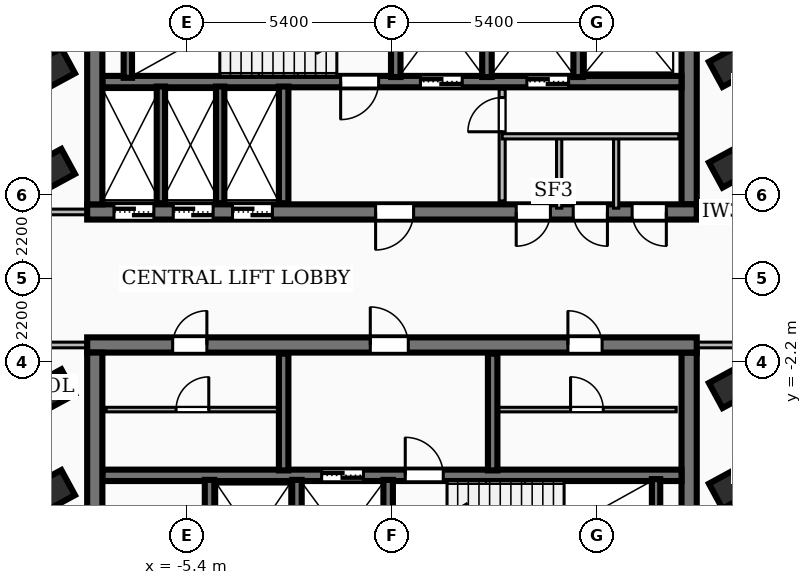
"""IFC4 building model, lengths in metres.
Left out: names, types, materials, properties, quantities, classifications, styles, units other than length and angle.
Written with IfcOpenShell. Run it as: python <this file> out.ifc"""

import sys

from ifc_helpers import new_model, si_unit, direction, frame, frame_2d, origin, origin_2d, place, context, subcontext, project, spatial, rectangle, extrude, element, fill, save


model = new_model("IFC4")
c1 = context("Model", 3, precision=1e-05, world=origin(), true_north=direction((0.0, 1.0)))
c2 = subcontext(c1, "Body", "Model", "MODEL_VIEW")
j1 = project(units=[si_unit("LENGTHUNIT", "METRE"), si_unit("PLANEANGLEUNIT", "RADIAN")], contexts=[c1])
p1 = place(None, origin())
s1 = spatial("IfcSite", under=j1, at=p1, CompositionType="ELEMENT")
p2 = place(p1, origin())
s2 = spatial("IfcBuilding", under=s1, at=p2, CompositionType="ELEMENT")
p3 = place(p2, frame((0.0, 0.0, 200.88)))
s3 = spatial("IfcBuildingStorey", under=s2, at=p3, CompositionType="ELEMENT", Elevation=200.88)
p4 = place(p3, frame((8.02, 1.75, 0.0), z_axis=(0.0, 0.0, 1.0), x_axis=(-1.0, 0.0, 0.0)))
e1 = element("IfcWall", 1, at=p4, inside=s3, PredefinedType="SHEAR", context=c2, shape_type="SweptSolid", body=[
    extrude(rectangle(XDim=16.04, YDim=0.4, at=frame_2d((8.02, 0.0))), origin(), (0.0, 0.0, 1.0), 4.06),
])
p5 = place(p4, frame((7.45, 0.0, 0.0)))
e2 = element("IfcOpeningElement", 2, at=p5, cuts=e1, PredefinedType="OPENING", context=c2, shape_type="SweptSolid", body=[
    extrude(rectangle(XDim=1.0, YDim=2.1, at=frame_2d((0.5, 1.05))), frame((0.0, 0.21, 0.0), z_axis=(0.0, -1.0, 0.0), x_axis=(1.0, 0.0, 0.0)), (0.0, 0.0, 1.0), 0.42),
])
p6 = place(p4, frame((14.285, 0.0, 0.0)))
e3 = element("IfcOpeningElement", 3, at=p6, cuts=e1, PredefinedType="OPENING", context=c2, shape_type="SweptSolid", body=[
    extrude(rectangle(XDim=1.05, YDim=2.15, at=frame_2d((0.525, 1.075))), frame((0.0, 0.21, 0.0), z_axis=(0.0, -1.0, 0.0), x_axis=(1.0, 0.0, 0.0)), (0.0, 0.0, 1.0), 0.42),
])
p7 = place(p4, frame((12.725, 0.0, 0.0)))
e4 = element("IfcOpeningElement", 4, at=p7, cuts=e1, PredefinedType="OPENING", context=c2, shape_type="SweptSolid", body=[
    extrude(rectangle(XDim=1.05, YDim=2.15, at=frame_2d((0.525, 1.075))), frame((0.0, 0.21, 0.0), z_axis=(0.0, -1.0, 0.0), x_axis=(1.0, 0.0, 0.0)), (0.0, 0.0, 1.0), 0.42),
])
p8 = place(p4, frame((11.165, 0.0, 0.0)))
e5 = element("IfcOpeningElement", 5, at=p8, cuts=e1, PredefinedType="OPENING", context=c2, shape_type="SweptSolid", body=[
    extrude(rectangle(XDim=1.05, YDim=2.15, at=frame_2d((0.525, 1.075))), frame((0.0, 0.21, 0.0), z_axis=(0.0, -1.0, 0.0), x_axis=(1.0, 0.0, 0.0)), (0.0, 0.0, 1.0), 0.42),
])
p9 = place(p4, frame((3.85, 0.0, 0.0)))
e6 = element("IfcOpeningElement", 6, at=p9, cuts=e1, PredefinedType="OPENING", context=c2, shape_type="SweptSolid", body=[
    extrude(rectangle(XDim=0.9, YDim=2.06, at=frame_2d((0.45, 1.03))), frame((0.0, 0.21, 0.0), z_axis=(0.0, -1.0, 0.0), x_axis=(1.0, 0.0, 0.0)), (0.0, 0.0, 1.0), 0.42),
])
p10 = place(p4, frame((2.35, 0.0, 0.0)))
e7 = element("IfcOpeningElement", 7, at=p10, cuts=e1, PredefinedType="OPENING", context=c2, shape_type="SweptSolid", body=[
    extrude(rectangle(XDim=0.9, YDim=2.06, at=frame_2d((0.45, 1.03))), frame((0.0, 0.21, 0.0), z_axis=(0.0, -1.0, 0.0), x_axis=(1.0, 0.0, 0.0)), (0.0, 0.0, 1.0), 0.42),
])
p11 = place(p4, frame((0.8, 0.0, 0.0)))
e8 = element("IfcOpeningElement", 8, at=p11, cuts=e1, PredefinedType="OPENING", context=c2, shape_type="SweptSolid", body=[
    extrude(rectangle(XDim=0.9, YDim=2.06, at=frame_2d((0.45, 1.03))), frame((0.0, 0.21, 0.0), z_axis=(0.0, -1.0, 0.0), x_axis=(1.0, 0.0, 0.0)), (0.0, 0.0, 1.0), 0.42),
])
for number, where, z_axis, x_axis in (
    (9, (-7.82, 1.95, 0.0), (0.0, 0.0, 1.0), (0.0, 1.0, 0.0)),
    (10, (7.82, 8.31, 0.0), (0.0, 0.0, 1.0), (0.0, -1.0, 0.0)),
):
    element("IfcWall", number, at=place(p3, frame(where, z_axis=z_axis, x_axis=x_axis)), inside=s3, PredefinedType="SHEAR", context=c2, shape_type="SweptSolid", body=[
        extrude(rectangle(XDim=6.36, YDim=0.4, at=frame_2d((3.18, 0.0))), origin(), (0.0, 0.0, 1.0), 4.06),
    ])
p12 = place(p3, frame((7.62, 5.18, 0.0), z_axis=(0.0, 0.0, 1.0), x_axis=(-1.0, 0.0, 0.0)))
e11 = element("IfcWall", 11, at=p12, inside=s3, PredefinedType="SOLIDWALL", context=c2, shape_type="SweptSolid", body=[
    extrude(rectangle(XDim=15.24, YDim=0.3, at=frame_2d((7.62, 0.0))), origin(), (0.0, 0.0, 1.0), 4.06),
])
p13 = place(p12, frame((5.77, 0.0, 0.0)))
e12 = element("IfcOpeningElement", 12, at=p13, cuts=e11, PredefinedType="OPENING", context=c2, shape_type="SweptSolid", body=[
    extrude(rectangle(XDim=1.1, YDim=2.15, at=frame_2d((0.55, 1.075))), frame((0.0, 0.16, 0.0), z_axis=(0.0, -1.0, 0.0), x_axis=(1.0, 0.0, 0.0)), (0.0, 0.0, 1.0), 0.32),
])
p14 = place(p12, frame((2.97, 0.0, 0.0)))
e13 = element("IfcOpeningElement", 13, at=p14, cuts=e11, PredefinedType="OPENING", context=c2, shape_type="SweptSolid", body=[
    extrude(rectangle(XDim=1.1, YDim=2.15, at=frame_2d((0.55, 1.075))), frame((0.0, 0.16, 0.0), z_axis=(0.0, -1.0, 0.0), x_axis=(1.0, 0.0, 0.0)), (0.0, 0.0, 1.0), 0.32),
])
p15 = place(p12, frame((7.97, 0.0, 0.0)))
e14 = element("IfcOpeningElement", 14, at=p15, cuts=e11, PredefinedType="OPENING", context=c2, shape_type="SweptSolid", body=[
    extrude(rectangle(XDim=1.0, YDim=2.1, at=frame_2d((0.5, 1.05))), frame((0.0, 0.16, 0.0), z_axis=(0.0, -1.0, 0.0), x_axis=(1.0, 0.0, 0.0)), (0.0, 0.0, 1.0), 0.32),
])
p16 = place(p3, frame((-8.02, -1.75, 0.0), z_axis=(0.0, 0.0, 1.0), x_axis=(1.0, 0.0, 0.0)))
e15 = element("IfcWall", 15, at=p16, inside=s3, PredefinedType="SHEAR", context=c2, shape_type="SweptSolid", body=[
    extrude(rectangle(XDim=16.04, YDim=0.4, at=frame_2d((8.02, 0.0))), origin(), (0.0, 0.0, 1.0), 4.06),
])
p17 = place(p16, frame((7.45, 0.0, 0.0)))
e16 = element("IfcOpeningElement", 16, at=p17, cuts=e15, PredefinedType="OPENING", context=c2, shape_type="SweptSolid", body=[
    extrude(rectangle(XDim=1.0, YDim=2.1, at=frame_2d((0.5, 1.05))), frame((0.0, 0.21, 0.0), z_axis=(0.0, -1.0, 0.0), x_axis=(1.0, 0.0, 0.0)), (0.0, 0.0, 1.0), 0.42),
])
p18 = place(p16, frame((12.65, 0.0, 0.0)))
e17 = element("IfcOpeningElement", 17, at=p18, cuts=e15, PredefinedType="OPENING", context=c2, shape_type="SweptSolid", body=[
    extrude(rectangle(XDim=0.9, YDim=2.06, at=frame_2d((0.45, 1.03))), frame((0.0, 0.21, 0.0), z_axis=(0.0, -1.0, 0.0), x_axis=(1.0, 0.0, 0.0)), (0.0, 0.0, 1.0), 0.42),
])
p19 = place(p16, frame((2.25, 0.0, 0.0)))
e18 = element("IfcOpeningElement", 18, at=p19, cuts=e15, PredefinedType="OPENING", context=c2, shape_type="SweptSolid", body=[
    extrude(rectangle(XDim=0.9, YDim=2.06, at=frame_2d((0.45, 1.03))), frame((0.0, 0.21, 0.0), z_axis=(0.0, -1.0, 0.0), x_axis=(1.0, 0.0, 0.0)), (0.0, 0.0, 1.0), 0.42),
])
for number, where, z_axis, x_axis in (
    (19, (-7.82, -8.31, 0.0), (0.0, 0.0, 1.0), (0.0, 1.0, 0.0)),
    (20, (7.82, -1.95, 0.0), (0.0, 0.0, 1.0), (0.0, -1.0, 0.0)),
):
    element("IfcWall", number, at=place(p3, frame(where, z_axis=z_axis, x_axis=x_axis)), inside=s3, PredefinedType="SHEAR", context=c2, shape_type="SweptSolid", body=[
        extrude(rectangle(XDim=6.36, YDim=0.4, at=frame_2d((3.18, 0.0))), origin(), (0.0, 0.0, 1.0), 4.06),
    ])
p20 = place(p3, frame((-7.62, -5.18, 0.0), z_axis=(0.0, 0.0, 1.0), x_axis=(1.0, 0.0, 0.0)))
e21 = element("IfcWall", 21, at=p20, inside=s3, PredefinedType="SOLIDWALL", context=c2, shape_type="SweptSolid", body=[
    extrude(rectangle(XDim=15.24, YDim=0.3, at=frame_2d((7.62, 0.0))), origin(), (0.0, 0.0, 1.0), 4.06),
])
p21 = place(p20, frame((5.77, 0.0, 0.0)))
e22 = element("IfcOpeningElement", 22, at=p21, cuts=e21, PredefinedType="OPENING", context=c2, shape_type="SweptSolid", body=[
    extrude(rectangle(XDim=1.1, YDim=2.15, at=frame_2d((0.55, 1.075))), frame((0.0, 0.16, 0.0), z_axis=(0.0, -1.0, 0.0), x_axis=(1.0, 0.0, 0.0)), (0.0, 0.0, 1.0), 0.32),
])
p22 = place(p20, frame((7.97, 0.0, 0.0)))
e23 = element("IfcOpeningElement", 23, at=p22, cuts=e21, PredefinedType="OPENING", context=c2, shape_type="SweptSolid", body=[
    extrude(rectangle(XDim=1.0, YDim=2.1, at=frame_2d((0.5, 1.05))), frame((0.0, 0.16, 0.0), z_axis=(0.0, -1.0, 0.0), x_axis=(1.0, 0.0, 0.0)), (0.0, 0.0, 1.0), 0.32),
])
for number, where, z_axis, x_axis in (
    (24, (-6.95, 5.28, 0.0), (0.0, 0.0, 1.0), (0.0, 1.0, 0.0)),
    (25, (6.95, -8.34, 0.0), (0.0, 0.0, 1.0), (0.0, 1.0, 0.0)),
):
    element("IfcWall", number, at=place(p3, frame(where, z_axis=z_axis, x_axis=x_axis)), inside=s3, PredefinedType="SOLIDWALL", context=c2, shape_type="SweptSolid", body=[
        extrude(rectangle(XDim=3.06, YDim=0.22, at=frame_2d((1.53, 0.0))), origin(), (0.0, 0.0, 1.0), 4.06),
    ])
for number, where, z_axis, x_axis in (
    (26, (0.1, 5.3, 0.0), (0.0, 0.0, 1.0), (0.0, 1.0, 0.0)),
    (27, (2.5, 5.3, 0.0), (0.0, 0.0, 1.0), (0.0, 1.0, 0.0)),
    (28, (4.9, 5.3, 0.0), (0.0, 0.0, 1.0), (0.0, 1.0, 0.0)),
):
    element("IfcWall", number, at=place(p3, frame(where, z_axis=z_axis, x_axis=x_axis)), inside=s3, PredefinedType="SOLIDWALL", context=c2, shape_type="SweptSolid", body=[
        extrude(rectangle(XDim=3.04, YDim=0.25, at=frame_2d((1.52, 0.0))), origin(), (0.0, 0.0, 1.0), 4.06),
    ])
p23 = place(p3, frame((-2.85, 1.98, 0.0), z_axis=(0.0, 0.0, 1.0), x_axis=(0.0, 1.0, 0.0)))
e29 = element("IfcWall", 29, at=p23, inside=s3, PredefinedType="SOLIDWALL", context=c2, shape_type="SweptSolid", body=[
    extrude(rectangle(XDim=3.07, YDim=0.25, at=frame_2d((1.535, 0.0))), origin(), (0.0, 0.0, 1.0), 4.06),
])
for number, where, z_axis, x_axis in (
    (30, (-0.1, -8.34, 0.0), (0.0, 0.0, 1.0), (0.0, 1.0, 0.0)),
    (31, (-2.5, -8.34, 0.0), (0.0, 0.0, 1.0), (0.0, 1.0, 0.0)),
    (32, (-4.8, -8.34, 0.0), (0.0, 0.0, 1.0), (0.0, 1.0, 0.0)),
):
    element("IfcWall", number, at=place(p3, frame(where, z_axis=z_axis, x_axis=x_axis)), inside=s3, PredefinedType="SOLIDWALL", context=c2, shape_type="SweptSolid", body=[
        extrude(rectangle(XDim=3.04, YDim=0.25, at=frame_2d((1.52, 0.0))), origin(), (0.0, 0.0, 1.0), 4.06),
    ])
for number, where, z_axis, x_axis in (
    (33, (-2.85, -5.05, 0.0), (0.0, 0.0, 1.0), (0.0, 1.0, 0.0)),
    (34, (2.65, -5.05, 0.0), (0.0, 0.0, 1.0), (0.0, 1.0, 0.0)),
):
    element("IfcWall", number, at=place(p3, frame(where, z_axis=z_axis, x_axis=x_axis)), inside=s3, PredefinedType="SOLIDWALL", context=c2, shape_type="SweptSolid", body=[
        extrude(rectangle(XDim=3.07, YDim=0.25, at=frame_2d((1.535, 0.0))), origin(), (0.0, 0.0, 1.0), 4.06),
    ])
for number, where, z_axis, x_axis in (
    (35, (-6.08, 1.98, 0.0), (0.0, 0.0, 1.0), (0.0, 1.0, 0.0)),
    (36, (-4.52, 1.98, 0.0), (0.0, 0.0, 1.0), (0.0, 1.0, 0.0)),
):
    element("IfcWall", number, at=place(p3, frame(where, z_axis=z_axis, x_axis=x_axis)), inside=s3, PredefinedType="SOLIDWALL", context=c2, shape_type="SweptSolid", body=[
        extrude(rectangle(XDim=3.07, YDim=0.22, at=frame_2d((1.535, 0.0))), origin(), (0.0, 0.0, 1.0), 4.06),
    ])
for number, where, z_axis, x_axis in (
    (37, (-8.85, -5.55, 0.0), (0.0, 0.0, 1.0), (0.879, 0.477, 0.0)),
    (38, (-8.85, -2.9, 0.0), (0.0, 0.0, 1.0), (0.879, 0.477, 0.0)),
    (39, (-8.85, 2.9, 0.0), (0.0, 0.0, 1.0), (0.879, 0.477, 0.0)),
    (40, (-8.85, 5.55, 0.0), (0.0, 0.0, 1.0), (0.879, 0.477, 0.0)),
    (41, (8.85, -5.55, 0.0), (0.0, 0.0, 1.0), (0.879, 0.477, 0.0)),
    (42, (8.85, -2.9, 0.0), (0.0, 0.0, 1.0), (0.879, 0.477, 0.0)),
    (43, (8.85, 2.9, 0.0), (0.0, 0.0, 1.0), (0.879, 0.477, 0.0)),
    (44, (8.85, 5.55, 0.0), (0.0, 0.0, 1.0), (0.879, 0.477, 0.0)),
):
    element("IfcColumn", number, at=place(p3, frame(where, z_axis=z_axis, x_axis=x_axis)), inside=s3, PredefinedType="COLUMN", context=c2, shape_type="SweptSolid", body=[
        extrude(rectangle(XDim=0.75, YDim=0.75, at=origin_2d()), origin(), (0.0, 0.0, 1.0), 4.32),
    ])
p24 = place(p3, frame((-6.514, -18.286, 0.0), z_axis=(0.0, 0.0, 1.0), x_axis=(-0.477173953596, 0.878808863183, 0.0)))
e45 = element("IfcWall", 45, at=p24, inside=s3, PredefinedType="SOLIDWALL", context=c2, shape_type="SweptSolid", body=[
    extrude(rectangle(XDim=25.924, YDim=0.2, at=frame_2d((12.962, 0.0))), origin(), (0.0, 0.0, 1.0), 4.06),
])
p25 = place(p24, frame((12.412, 0.0, 0.0)))
e46 = element("IfcOpeningElement", 46, at=p25, cuts=e45, PredefinedType="OPENING", context=c2, shape_type="SweptSolid", body=[
    extrude(rectangle(XDim=1.1, YDim=2.1, at=frame_2d((0.55, 1.05))), frame((0.0, 0.11, 0.0), z_axis=(0.0, -1.0, 0.0), x_axis=(1.0, 0.0, 0.0)), (0.0, 0.0, 1.0), 0.22),
])
p26 = place(p3, frame((2.9, 2.04, 0.0), z_axis=(0.0, 0.0, 1.0), x_axis=(0.0, 1.0, 0.0)))
e47 = element("IfcWall", 47, at=p26, inside=s3, PredefinedType="PARTITIONING", context=c2, shape_type="SweptSolid", body=[
    extrude(rectangle(XDim=2.94, YDim=0.16, at=frame_2d((1.47, 0.0))), origin(), (0.0, 0.0, 1.0), 3.29),
])
p27 = place(p26, frame((1.82, 0.0, 0.0)))
e48 = element("IfcOpeningElement", 48, at=p27, cuts=e47, PredefinedType="OPENING", context=c2, shape_type="SweptSolid", body=[
    extrude(rectangle(XDim=0.9, YDim=2.06, at=frame_2d((0.45, 1.03))), frame((0.0, 0.09, 0.0), z_axis=(0.0, -1.0, 0.0), x_axis=(1.0, 0.0, 0.0)), (0.0, 0.0, 1.0), 0.18),
])
p28 = place(p3, frame((2.9, 3.74, 0.0), z_axis=(0.0, 0.0, 1.0), x_axis=(1.0, 0.0, 0.0)))
e49 = element("IfcWall", 49, at=p28, inside=s3, PredefinedType="PARTITIONING", context=c2, shape_type="SweptSolid", body=[
    extrude(rectangle(XDim=4.65, YDim=0.138, at=frame_2d((2.325, 0.0))), origin(), (0.0, 0.0, 1.0), 4.06),
])
p29 = place(p3, frame((2.8, -3.45, 0.0), z_axis=(0.0, 0.0, 1.0), x_axis=(1.0, 0.0, 0.0)))
e50 = element("IfcWall", 50, at=p29, inside=s3, PredefinedType="PARTITIONING", context=c2, shape_type="SweptSolid", body=[
    extrude(rectangle(XDim=4.68, YDim=0.12, at=frame_2d((2.34, 0.0))), origin(), (0.0, 0.0, 1.0), 4.06),
])
p30 = place(p29, frame((1.9, 0.0, 0.0)))
e51 = element("IfcOpeningElement", 51, at=p30, cuts=e50, PredefinedType="OPENING", context=c2, shape_type="SweptSolid", body=[
    extrude(rectangle(XDim=0.86, YDim=2.04, at=frame_2d((0.43, 1.02))), frame((0.0, 0.07, 0.0), z_axis=(0.0, -1.0, 0.0), x_axis=(1.0, 0.0, 0.0)), (0.0, 0.0, 1.0), 0.14),
])
p31 = place(p3, frame((-7.52, -3.45, 0.0), z_axis=(0.0, 0.0, 1.0), x_axis=(1.0, 0.0, 0.0)))
e52 = element("IfcWall", 52, at=p31, inside=s3, PredefinedType="PARTITIONING", context=c2, shape_type="SweptSolid", body=[
    extrude(rectangle(XDim=4.54, YDim=0.12, at=frame_2d((2.27, 0.0))), origin(), (0.0, 0.0, 1.0), 4.06),
])
p32 = place(p31, frame((1.84, 0.0, 0.0)))
e53 = element("IfcOpeningElement", 53, at=p32, cuts=e52, PredefinedType="OPENING", context=c2, shape_type="SweptSolid", body=[
    extrude(rectangle(XDim=0.86, YDim=2.04, at=frame_2d((0.43, 1.02))), frame((0.0, 0.07, 0.0), z_axis=(0.0, -1.0, 0.0), x_axis=(1.0, 0.0, 0.0)), (0.0, 0.0, 1.0), 0.14),
])
for number, where, z_axis, x_axis in (
    (54, (4.4, 1.85, 0.0), (0.0, 0.0, 1.0), (0.0, 1.0, 0.0)),
    (55, (5.9, 1.85, 0.0), (0.0, 0.0, 1.0), (0.0, 1.0, 0.0)),
):
    element("IfcWall", number, at=place(p3, frame(where, z_axis=z_axis, x_axis=x_axis)), inside=s3, PredefinedType="PARTITIONING", context=c2, shape_type="SweptSolid", body=[
        extrude(rectangle(XDim=1.89, YDim=0.138, at=frame_2d((0.945, 0.0))), origin(), (0.0, 0.0, 1.0), 3.29),
    ])
for number, where, z_axis, x_axis in (
    (56, (-7.85, 1.75, 0.0), (0.0, 0.0, 1.0), (-1.0, 0.0, 0.0)),
    (57, (-7.85, -1.75, 0.0), (0.0, 0.0, 1.0), (-1.0, 0.0, 0.0)),
    (58, (7.85, 1.75, 0.0), (0.0, 0.0, 1.0), (1.0, 0.0, 0.0)),
    (59, (7.85, -1.75, 0.0), (0.0, 0.0, 1.0), (1.0, 0.0, 0.0)),
):
    element("IfcWall", number, at=place(p3, frame(where, z_axis=z_axis, x_axis=x_axis)), inside=s3, PredefinedType="PARTITIONING", context=c2, shape_type="SweptSolid", body=[
        extrude(rectangle(XDim=1.67, YDim=0.15, at=frame_2d((0.835, 0.0))), origin(), (0.0, 0.0, 1.0), 3.29),
    ])
p33 = place(p5, origin())
e60 = element("IfcDoor", 60, at=p33, inside=s3, OperationType="SINGLE_SWING_RIGHT", PredefinedType="DOOR", context=c2, shape_type="SweptSolid", body=[
    extrude(rectangle(XDim=1.0, YDim=2.1, at=frame_2d((0.5, 1.05))), frame((0.0, 0.025, 0.0), z_axis=(0.0, -1.0, 0.0), x_axis=(1.0, 0.0, 0.0)), (0.0, 0.0, 1.0), 0.05),
])
fill(e2, e60)
p34 = place(p17, origin())
e61 = element("IfcDoor", 61, at=p34, inside=s3, OperationType="SINGLE_SWING_LEFT", PredefinedType="DOOR", context=c2, shape_type="SweptSolid", body=[
    extrude(rectangle(XDim=1.0, YDim=2.1, at=frame_2d((0.5, 1.05))), frame((0.0, 0.025, 0.0), z_axis=(0.0, -1.0, 0.0), x_axis=(1.0, 0.0, 0.0)), (0.0, 0.0, 1.0), 0.05),
])
fill(e16, e61)
p35 = place(p13, origin())
e62 = element("IfcDoor", 62, at=p35, inside=s3, OperationType="DOUBLE_DOOR_SLIDING", PredefinedType="DOOR", context=c2, shape_type="SweptSolid", body=[
    extrude(rectangle(XDim=1.1, YDim=2.15, at=frame_2d((0.55, 1.075))), frame((0.0, 0.025, 0.0), z_axis=(0.0, -1.0, 0.0), x_axis=(1.0, 0.0, 0.0)), (0.0, 0.0, 1.0), 0.05),
])
fill(e12, e62)
p36 = place(p14, origin())
e63 = element("IfcDoor", 63, at=p36, inside=s3, OperationType="DOUBLE_DOOR_SLIDING", PredefinedType="DOOR", context=c2, shape_type="SweptSolid", body=[
    extrude(rectangle(XDim=1.1, YDim=2.15, at=frame_2d((0.55, 1.075))), frame((0.0, 0.025, 0.0), z_axis=(0.0, -1.0, 0.0), x_axis=(1.0, 0.0, 0.0)), (0.0, 0.0, 1.0), 0.05),
])
fill(e13, e63)
p37 = place(p15, origin())
e64 = element("IfcDoor", 64, at=p37, inside=s3, OperationType="SINGLE_SWING_RIGHT", PredefinedType="DOOR", context=c2, shape_type="SweptSolid", body=[
    extrude(rectangle(XDim=1.0, YDim=2.1, at=frame_2d((0.5, 1.05))), frame((0.0, 0.025, 0.0), z_axis=(0.0, -1.0, 0.0), x_axis=(1.0, 0.0, 0.0)), (0.0, 0.0, 1.0), 0.05),
])
fill(e14, e64)
p38 = place(p21, origin())
e65 = element("IfcDoor", 65, at=p38, inside=s3, OperationType="DOUBLE_DOOR_SLIDING", PredefinedType="DOOR", context=c2, shape_type="SweptSolid", body=[
    extrude(rectangle(XDim=1.1, YDim=2.15, at=frame_2d((0.55, 1.075))), frame((0.0, 0.025, 0.0), z_axis=(0.0, -1.0, 0.0), x_axis=(1.0, 0.0, 0.0)), (0.0, 0.0, 1.0), 0.05),
])
fill(e22, e65)
p39 = place(p22, origin())
e66 = element("IfcDoor", 66, at=p39, inside=s3, OperationType="SINGLE_SWING_LEFT", PredefinedType="DOOR", context=c2, shape_type="SweptSolid", body=[
    extrude(rectangle(XDim=1.0, YDim=2.1, at=frame_2d((0.5, 1.05))), frame((0.0, 0.025, 0.0), z_axis=(0.0, -1.0, 0.0), x_axis=(1.0, 0.0, 0.0)), (0.0, 0.0, 1.0), 0.05),
])
fill(e23, e66)
p40 = place(p6, origin())
e67 = element("IfcDoor", 67, at=p40, inside=s3, OperationType="DOUBLE_DOOR_SLIDING", PredefinedType="DOOR", context=c2, shape_type="SweptSolid", body=[
    extrude(rectangle(XDim=1.05, YDim=2.15, at=frame_2d((0.525, 1.075))), frame((0.0, 0.025, 0.0), z_axis=(0.0, -1.0, 0.0), x_axis=(1.0, 0.0, 0.0)), (0.0, 0.0, 1.0), 0.05),
])
fill(e3, e67)
p41 = place(p7, origin())
e68 = element("IfcDoor", 68, at=p41, inside=s3, OperationType="DOUBLE_DOOR_SLIDING", PredefinedType="DOOR", context=c2, shape_type="SweptSolid", body=[
    extrude(rectangle(XDim=1.05, YDim=2.15, at=frame_2d((0.525, 1.075))), frame((0.0, 0.025, 0.0), z_axis=(0.0, -1.0, 0.0), x_axis=(1.0, 0.0, 0.0)), (0.0, 0.0, 1.0), 0.05),
])
fill(e4, e68)
p42 = place(p8, origin())
e69 = element("IfcDoor", 69, at=p42, inside=s3, OperationType="DOUBLE_DOOR_SLIDING", PredefinedType="DOOR", context=c2, shape_type="SweptSolid", body=[
    extrude(rectangle(XDim=1.05, YDim=2.15, at=frame_2d((0.525, 1.075))), frame((0.0, 0.025, 0.0), z_axis=(0.0, -1.0, 0.0), x_axis=(1.0, 0.0, 0.0)), (0.0, 0.0, 1.0), 0.05),
])
fill(e5, e69)
p43 = place(p18, origin())
e70 = element("IfcDoor", 70, at=p43, inside=s3, OperationType="SINGLE_SWING_LEFT", PredefinedType="DOOR", context=c2, shape_type="SweptSolid", body=[
    extrude(rectangle(XDim=0.9, YDim=2.06, at=frame_2d((0.45, 1.03))), frame((0.0, 0.025, 0.0), z_axis=(0.0, -1.0, 0.0), x_axis=(1.0, 0.0, 0.0)), (0.0, 0.0, 1.0), 0.05),
])
fill(e17, e70)
p44 = place(p19, origin())
e71 = element("IfcDoor", 71, at=p44, inside=s3, OperationType="SINGLE_SWING_RIGHT", PredefinedType="DOOR", context=c2, shape_type="SweptSolid", body=[
    extrude(rectangle(XDim=0.9, YDim=2.06, at=frame_2d((0.45, 1.03))), frame((0.0, 0.025, 0.0), z_axis=(0.0, -1.0, 0.0), x_axis=(1.0, 0.0, 0.0)), (0.0, 0.0, 1.0), 0.05),
])
fill(e18, e71)
p45 = place(p9, origin())
e72 = element("IfcDoor", 72, at=p45, inside=s3, OperationType="SINGLE_SWING_RIGHT", PredefinedType="DOOR", context=c2, shape_type="SweptSolid", body=[
    extrude(rectangle(XDim=0.9, YDim=2.06, at=frame_2d((0.45, 1.03))), frame((0.0, 0.025, 0.0), z_axis=(0.0, -1.0, 0.0), x_axis=(1.0, 0.0, 0.0)), (0.0, 0.0, 1.0), 0.05),
])
fill(e6, e72)
p46 = place(p10, origin())
e73 = element("IfcDoor", 73, at=p46, inside=s3, OperationType="SINGLE_SWING_LEFT", PredefinedType="DOOR", context=c2, shape_type="SweptSolid", body=[
    extrude(rectangle(XDim=0.9, YDim=2.06, at=frame_2d((0.45, 1.03))), frame((0.0, 0.025, 0.0), z_axis=(0.0, -1.0, 0.0), x_axis=(1.0, 0.0, 0.0)), (0.0, 0.0, 1.0), 0.05),
])
fill(e7, e73)
p47 = place(p11, origin())
e74 = element("IfcDoor", 74, at=p47, inside=s3, OperationType="SINGLE_SWING_LEFT", PredefinedType="DOOR", context=c2, shape_type="SweptSolid", body=[
    extrude(rectangle(XDim=0.9, YDim=2.06, at=frame_2d((0.45, 1.03))), frame((0.0, 0.025, 0.0), z_axis=(0.0, -1.0, 0.0), x_axis=(1.0, 0.0, 0.0)), (0.0, 0.0, 1.0), 0.05),
])
fill(e8, e74)
p48 = place(p27, origin())
e75 = element("IfcDoor", 75, at=p48, inside=s3, OperationType="SINGLE_SWING_LEFT", PredefinedType="DOOR", context=c2, shape_type="SweptSolid", body=[
    extrude(rectangle(XDim=0.9, YDim=2.06, at=frame_2d((0.45, 1.03))), frame((0.0, 0.025, 0.0), z_axis=(0.0, -1.0, 0.0), x_axis=(1.0, 0.0, 0.0)), (0.0, 0.0, 1.0), 0.05),
])
fill(e48, e75)
p49 = place(p30, origin())
e76 = element("IfcDoor", 76, at=p49, inside=s3, OperationType="SINGLE_SWING_LEFT", PredefinedType="DOOR", context=c2, shape_type="SweptSolid", body=[
    extrude(rectangle(XDim=0.86, YDim=2.04, at=frame_2d((0.43, 1.02))), frame((0.0, 0.025, 0.0), z_axis=(0.0, -1.0, 0.0), x_axis=(1.0, 0.0, 0.0)), (0.0, 0.0, 1.0), 0.05),
])
fill(e51, e76)
p50 = place(p32, origin())
e77 = element("IfcDoor", 77, at=p50, inside=s3, OperationType="SINGLE_SWING_RIGHT", PredefinedType="DOOR", context=c2, shape_type="SweptSolid", body=[
    extrude(rectangle(XDim=0.86, YDim=2.04, at=frame_2d((0.43, 1.02))), frame((0.0, 0.025, 0.0), z_axis=(0.0, -1.0, 0.0), x_axis=(1.0, 0.0, 0.0)), (0.0, 0.0, 1.0), 0.05),
])
fill(e53, e77)
save(model, sys.argv[1])
